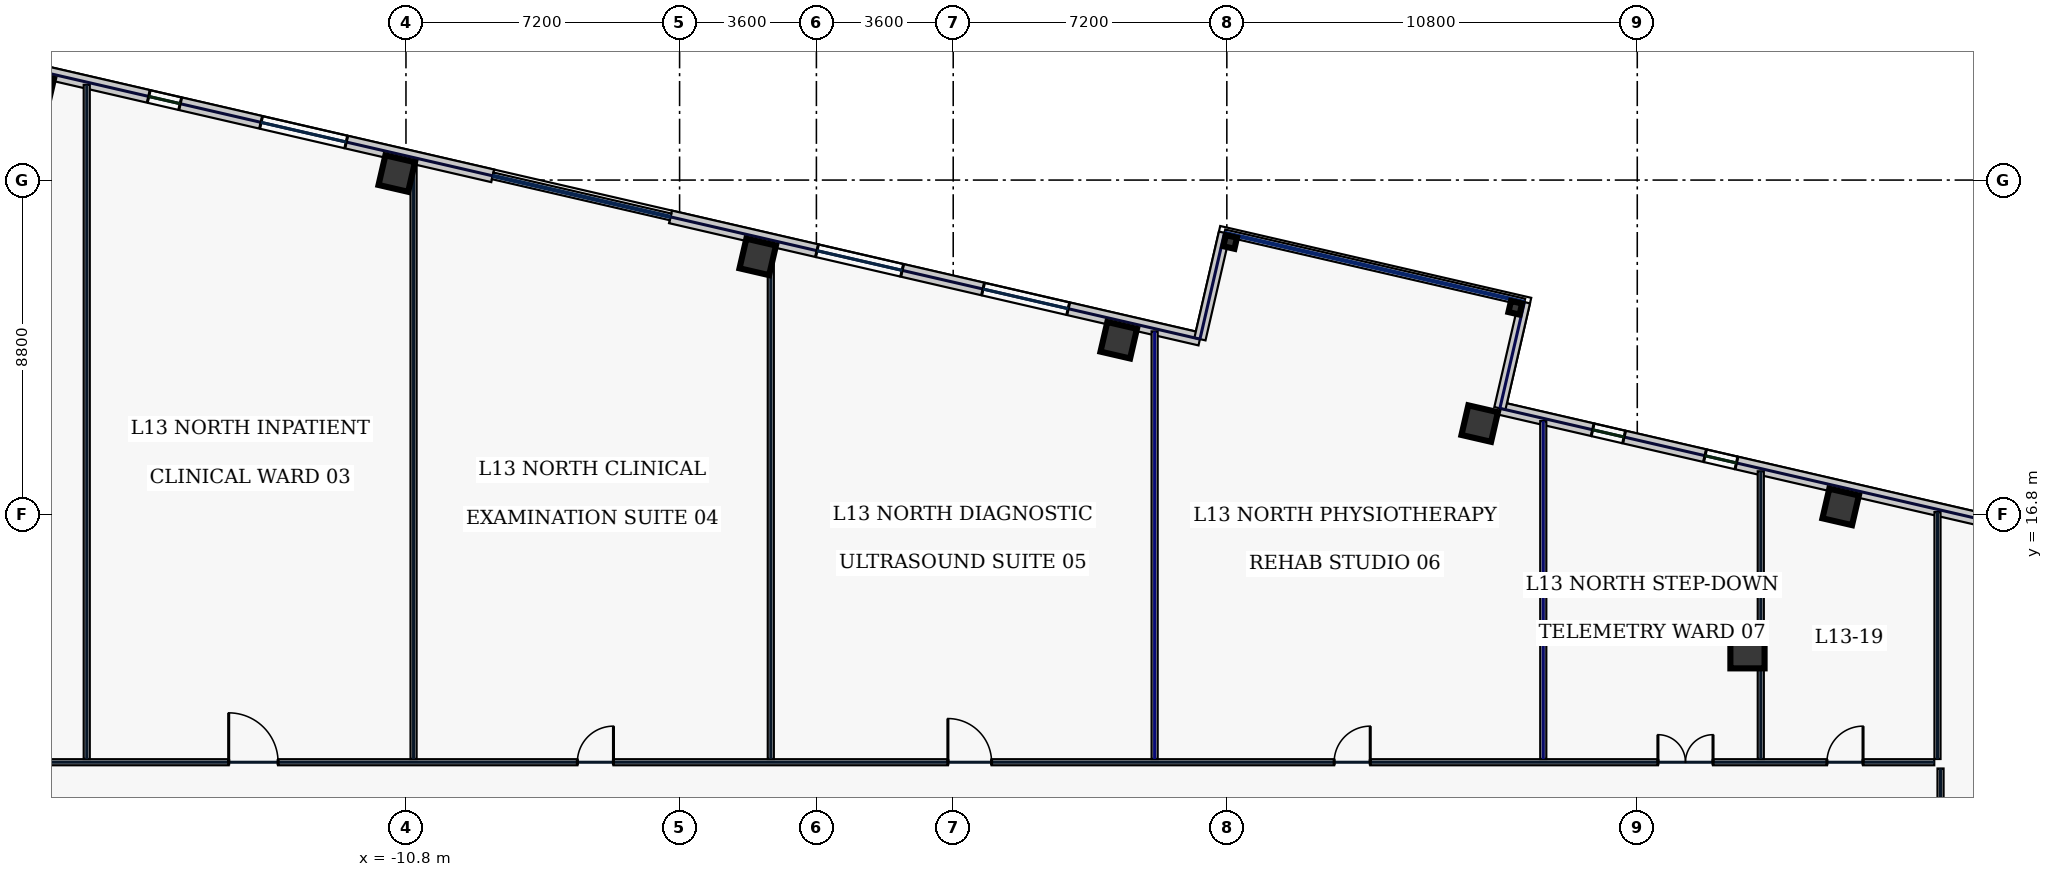
"""IFC4 building model, lengths in metres.
Left out: names, types, materials, properties, quantities, classifications, styles, units other than length and angle.
Written with IfcOpenShell. Run it as: python <this file> out.ifc"""

import sys

from ifc_helpers import new_model, si_unit, direction, frame, frame_2d, origin, origin_2d, place, context, subcontext, project, spatial, rectangle, hollow_rectangle, extrude, element, fill, save


model = new_model("IFC4")
c1 = context("Model", 3, precision=1e-05, world=origin(), true_north=direction((0.0, 1.0)))
c2 = subcontext(c1, "Body", "Model", "MODEL_VIEW")
j1 = project(units=[si_unit("LENGTHUNIT", "METRE"), si_unit("PLANEANGLEUNIT", "RADIAN")], contexts=[c1])
p1 = place(None, origin())
s1 = spatial("IfcSite", under=j1, at=p1, CompositionType="ELEMENT")
p2 = place(p1, origin())
s2 = spatial("IfcBuilding", under=s1, at=p2, CompositionType="ELEMENT")
p3 = place(p2, frame((0.0, 0.0, 63.4)))
s3 = spatial("IfcBuildingStorey", under=s2, at=p3, CompositionType="ELEMENT", Elevation=63.4)
p4 = place(p3, frame((24.5, 13.2, 0.0), z_axis=(0.0, 0.0, 1.0), x_axis=(1.0, 0.0, 0.0)))
e1 = element("IfcColumn", 1, at=p4, inside=s3, PredefinedType="COLUMN", context=c2, shape_type="SweptSolid", body=[
    extrude(hollow_rectangle(XDim=0.9, YDim=0.9, WallThickness=0.04, at=origin_2d()), origin(), (0.0, 0.0, 1.0), 3.74),
])
for number, where, z_axis, x_axis in (
    (2, (26.952, 16.999, 0.0), (0.0, 0.0, 1.0), (0.974, -0.225, 0.0)),
    (3, (17.454, 19.192, 0.0), (0.0, 0.0, 1.0), (0.974, -0.225, 0.0)),
    (4, (7.955, 21.385, 0.0), (0.0, 0.0, 1.0), (0.974, -0.225, 0.0)),
    (5, (-1.544, 23.578, 0.0), (0.0, 0.0, 1.0), (0.974, -0.225, 0.0)),
    (6, (-11.042, 25.771, 0.0), (0.0, 0.0, 1.0), (0.974, -0.225, 0.0)),
    (7, (-20.541, 27.964, 0.0), (0.0, 0.0, 1.0), (0.974, -0.225, 0.0)),
):
    element("IfcColumn", number, at=place(p3, frame(where, z_axis=z_axis, x_axis=x_axis)), inside=s3, PredefinedType="COLUMN", context=c2, shape_type="SweptSolid", body=[
        extrude(hollow_rectangle(XDim=0.8, YDim=0.8, WallThickness=0.036, at=origin_2d()), origin(), (0.0, 0.0, 1.0), 3.74),
    ])
for number, where, z_axis, x_axis in (
    (8, (10.888, 23.971, 0.0), (0.0, 0.0, 1.0), (0.974, -0.225, 0.0)),
    (9, (18.391, 22.239, 0.0), (0.0, 0.0, 1.0), (0.974, -0.225, 0.0)),
):
    element("IfcColumn", number, at=place(p3, frame(where, z_axis=z_axis, x_axis=x_axis)), inside=s3, PredefinedType="COLUMN", context=c2, shape_type="SweptSolid", body=[
        extrude(hollow_rectangle(XDim=0.3, YDim=0.3, WallThickness=0.016, at=origin_2d()), origin(), (0.0, 0.0, 1.0), 3.74),
    ])
p5 = place(p3, frame((37.229, 15.15, 0.0), z_axis=(0.0, 0.0, 1.0), x_axis=(-0.974368689865, 0.224957009695, 0.0)))
e10 = element("IfcWall", 10, at=p5, inside=s3, PredefinedType="STANDARD", context=c2, shape_type="SweptSolid", body=[
    extrude(rectangle(XDim=19.75, YDim=0.34, at=frame_2d((9.875, 0.0))), origin(), (0.0, 0.0, 1.0), 3.74),
])
p6 = place(p5, frame((16.395, 0.0, 0.77)))
e11 = element("IfcOpeningElement", 11, at=p6, cuts=e10, PredefinedType="OPENING", context=c2, shape_type="SweptSolid", body=[
    extrude(rectangle(XDim=0.85, YDim=1.85, at=frame_2d((0.425, 0.925))), frame((0.0, 0.18, 0.0), z_axis=(0.0, -1.0, 0.0), x_axis=(1.0, 0.0, 0.0)), (0.0, 0.0, 1.0), 0.36),
])
p7 = place(p5, frame((13.361, 0.0, 0.77)))
e12 = element("IfcOpeningElement", 12, at=p7, cuts=e10, PredefinedType="OPENING", context=c2, shape_type="SweptSolid", body=[
    extrude(rectangle(XDim=0.85, YDim=1.85, at=frame_2d((0.425, 0.925))), frame((0.0, 0.18, 0.0), z_axis=(0.0, -1.0, 0.0), x_axis=(1.0, 0.0, 0.0)), (0.0, 0.0, 1.0), 0.36),
])
p8 = place(p5, frame((2.162, 0.0, 0.77)))
e13 = element("IfcOpeningElement", 13, at=p8, cuts=e10, PredefinedType="OPENING", context=c2, shape_type="SweptSolid", body=[
    extrude(rectangle(XDim=2.3, YDim=2.1, at=frame_2d((1.15, 1.05))), frame((0.0, 0.18, 0.0), z_axis=(0.0, -1.0, 0.0), x_axis=(1.0, 0.0, 0.0)), (0.0, 0.0, 1.0), 0.36),
])
p9 = place(p3, frame((10.092, 21.415, 0.0), z_axis=(0.0, 0.0, 1.0), x_axis=(-0.97436816851, 0.224959267855, 0.0)))
e14 = element("IfcWall", 14, at=p9, inside=s3, PredefinedType="STANDARD", context=c2, shape_type="SweptSolid", body=[
    extrude(rectangle(XDim=14.298, YDim=0.34, at=frame_2d((7.149, 0.0))), origin(), (0.0, 0.0, 1.0), 3.74),
])
p10 = place(p9, frame((8.042, 0.0, 0.77)))
e15 = element("IfcOpeningElement", 15, at=p10, cuts=e14, PredefinedType="OPENING", context=c2, shape_type="SweptSolid", body=[
    extrude(rectangle(XDim=2.3, YDim=2.1, at=frame_2d((1.15, 1.05))), frame((0.0, 0.18, 0.0), z_axis=(0.0, -1.0, 0.0), x_axis=(1.0, 0.0, 0.0)), (0.0, 0.0, 1.0), 0.36),
])
p11 = place(p9, frame((3.558, 0.0, 0.77)))
e16 = element("IfcOpeningElement", 16, at=p11, cuts=e14, PredefinedType="OPENING", context=c2, shape_type="SweptSolid", body=[
    extrude(rectangle(XDim=2.3, YDim=2.1, at=frame_2d((1.15, 1.05))), frame((0.0, 0.18, 0.0), z_axis=(0.0, -1.0, 0.0), x_axis=(1.0, 0.0, 0.0)), (0.0, 0.0, 1.0), 0.36),
])
p12 = place(p3, frame((-8.517, 25.711, 0.0), z_axis=(0.0, 0.0, 1.0), x_axis=(-0.974372845456, 0.224939009598, 0.0)))
e17 = element("IfcWall", 17, at=p12, inside=s3, PredefinedType="STANDARD", context=c2, shape_type="SweptSolid", body=[
    extrude(rectangle(XDim=22.652, YDim=0.34, at=frame_2d((11.326, 0.0))), origin(), (0.0, 0.0, 1.0), 3.74),
])
p13 = place(p12, frame((18.189, 0.0, 0.77)))
e18 = element("IfcOpeningElement", 18, at=p13, cuts=e17, PredefinedType="OPENING", context=c2, shape_type="SweptSolid", body=[
    extrude(rectangle(XDim=2.3, YDim=2.1, at=frame_2d((1.15, 1.05))), frame((0.0, 0.18, 0.0), z_axis=(0.0, -1.0, 0.0), x_axis=(1.0, 0.0, 0.0)), (0.0, 0.0, 1.0), 0.36),
])
p14 = place(p12, frame((13.705, 0.0, 0.77)))
e19 = element("IfcOpeningElement", 19, at=p14, cuts=e17, PredefinedType="OPENING", context=c2, shape_type="SweptSolid", body=[
    extrude(rectangle(XDim=2.3, YDim=2.1, at=frame_2d((1.15, 1.05))), frame((0.0, 0.18, 0.0), z_axis=(0.0, -1.0, 0.0), x_axis=(1.0, 0.0, 0.0)), (0.0, 0.0, 1.0), 0.36),
])
p15 = place(p12, frame((8.441, 0.0, 0.77)))
e20 = element("IfcOpeningElement", 20, at=p15, cuts=e17, PredefinedType="OPENING", context=c2, shape_type="SweptSolid", body=[
    extrude(rectangle(XDim=0.85, YDim=1.85, at=frame_2d((0.425, 0.925))), frame((0.0, 0.18, 0.0), z_axis=(0.0, -1.0, 0.0), x_axis=(1.0, 0.0, 0.0)), (0.0, 0.0, 1.0), 0.36),
])
p16 = place(p12, frame((3.956, 0.0, 0.77)))
e21 = element("IfcOpeningElement", 21, at=p16, cuts=e17, PredefinedType="OPENING", context=c2, shape_type="SweptSolid", body=[
    extrude(rectangle(XDim=2.3, YDim=2.1, at=frame_2d((1.15, 1.05))), frame((0.0, 0.18, 0.0), z_axis=(0.0, -1.0, 0.0), x_axis=(1.0, 0.0, 0.0)), (0.0, 0.0, 1.0), 0.36),
])
p17 = place(p3, frame((10.092, 21.415, 0.0), z_axis=(0.0, 0.0, 1.0), x_axis=(0.225002397841, 0.97435820978, 0.0)))
e22 = element("IfcWall", 22, at=p17, inside=s3, PredefinedType="STANDARD", context=c2, shape_type="SweptSolid", body=[
    extrude(rectangle(XDim=2.87, YDim=0.3, at=frame_2d((1.435, 0.0))), origin(), (0.0, 0.0, 1.0), 1.535),
])
p18 = place(p3, frame((17.985, 19.593, 0.0), z_axis=(0.0, 0.0, 1.0), x_axis=(0.224921635065, 0.974376856293, 0.0)))
e23 = element("IfcWall", 23, at=p18, inside=s3, PredefinedType="STANDARD", context=c2, shape_type="SweptSolid", body=[
    extrude(rectangle(XDim=2.87, YDim=0.3, at=frame_2d((1.435, 0.0))), origin(), (0.0, 0.0, 1.0), 3.74),
])
p19 = place(p3, frame((-29.415, 10.28, 0.0), z_axis=(0.0, 0.0, 1.0), x_axis=(1.0, 0.0, 0.0)))
e24 = element("IfcWall", 24, at=p19, inside=s3, PredefinedType="PARTITIONING", context=c2, shape_type="SweptSolid", body=[
    extrude(rectangle(XDim=58.83, YDim=0.16, at=frame_2d((29.415, 0.0))), origin(), (0.0, 0.0, 1.0), 3.74),
])
p20 = place(p19, frame((1.869, 0.0, 0.0)))
e25 = element("IfcOpeningElement", 25, at=p20, cuts=e24, PredefinedType="OPENING", context=c2, shape_type="SweptSolid", body=[
    extrude(rectangle(XDim=1.45, YDim=2.2, at=frame_2d((0.725, 1.1))), frame((0.0, 0.09, 0.0), z_axis=(0.0, -1.0, 0.0), x_axis=(1.0, 0.0, 0.0)), (0.0, 0.0, 1.0), 0.18),
])
p21 = place(p19, frame((7.0, 0.0, 0.0)))
e26 = element("IfcOpeningElement", 26, at=p21, cuts=e24, PredefinedType="OPENING", context=c2, shape_type="SweptSolid", body=[
    extrude(rectangle(XDim=1.05, YDim=2.2, at=frame_2d((0.525, 1.1))), frame((0.0, 0.09, 0.0), z_axis=(0.0, -1.0, 0.0), x_axis=(1.0, 0.0, 0.0)), (0.0, 0.0, 1.0), 0.18),
])
p22 = place(p19, frame((13.95, 0.0, 0.0)))
e27 = element("IfcOpeningElement", 27, at=p22, cuts=e24, PredefinedType="OPENING", context=c2, shape_type="SweptSolid", body=[
    extrude(rectangle(XDim=1.3, YDim=2.2, at=frame_2d((0.65, 1.1))), frame((0.0, 0.09, 0.0), z_axis=(0.0, -1.0, 0.0), x_axis=(1.0, 0.0, 0.0)), (0.0, 0.0, 1.0), 0.18),
])
p23 = place(p19, frame((23.125, 0.0, 0.0)))
e28 = element("IfcOpeningElement", 28, at=p23, cuts=e24, PredefinedType="OPENING", context=c2, shape_type="SweptSolid", body=[
    extrude(rectangle(XDim=0.95, YDim=2.2, at=frame_2d((0.475, 1.1))), frame((0.0, 0.09, 0.0), z_axis=(0.0, -1.0, 0.0), x_axis=(1.0, 0.0, 0.0)), (0.0, 0.0, 1.0), 0.18),
])
p24 = place(p19, frame((32.875, 0.0, 0.0)))
e29 = element("IfcOpeningElement", 29, at=p24, cuts=e24, PredefinedType="OPENING", context=c2, shape_type="SweptSolid", body=[
    extrude(rectangle(XDim=1.15, YDim=2.2, at=frame_2d((0.575, 1.1))), frame((0.0, 0.09, 0.0), z_axis=(0.0, -1.0, 0.0), x_axis=(1.0, 0.0, 0.0)), (0.0, 0.0, 1.0), 0.18),
])
p25 = place(p19, frame((43.039, 0.0, 0.0)))
e30 = element("IfcOpeningElement", 30, at=p25, cuts=e24, PredefinedType="OPENING", context=c2, shape_type="SweptSolid", body=[
    extrude(rectangle(XDim=0.95, YDim=2.2, at=frame_2d((0.475, 1.1))), frame((0.0, 0.09, 0.0), z_axis=(0.0, -1.0, 0.0), x_axis=(1.0, 0.0, 0.0)), (0.0, 0.0, 1.0), 0.18),
])
p26 = place(p19, frame((51.559, 0.0, 0.0)))
e31 = element("IfcOpeningElement", 31, at=p26, cuts=e24, PredefinedType="OPENING", context=c2, shape_type="SweptSolid", body=[
    extrude(rectangle(XDim=1.45, YDim=2.2, at=frame_2d((0.725, 1.1))), frame((0.0, 0.09, 0.0), z_axis=(0.0, -1.0, 0.0), x_axis=(1.0, 0.0, 0.0)), (0.0, 0.0, 1.0), 0.18),
])
p27 = place(p19, frame((56.006, 0.0, 0.0)))
e32 = element("IfcOpeningElement", 32, at=p27, cuts=e24, PredefinedType="OPENING", context=c2, shape_type="SweptSolid", body=[
    extrude(rectangle(XDim=0.95, YDim=2.2, at=frame_2d((0.475, 1.1))), frame((0.0, 0.09, 0.0), z_axis=(0.0, -1.0, 0.0), x_axis=(1.0, 0.0, 0.0)), (0.0, 0.0, 1.0), 0.18),
])
p28 = place(p3, frame((29.58, 10.115, 0.0), z_axis=(0.0, 0.0, 1.0), x_axis=(0.0, -1.0, 0.0)))
e33 = element("IfcWall", 33, at=p28, inside=s3, PredefinedType="PARTITIONING", context=c2, shape_type="SweptSolid", body=[
    extrude(rectangle(XDim=20.13, YDim=0.16, at=frame_2d((10.065, 0.0))), origin(), (0.0, 0.0, 1.0), 3.74),
])
p29 = place(p28, frame((17.181, 0.0, 0.0)))
e34 = element("IfcOpeningElement", 34, at=p29, cuts=e33, PredefinedType="OPENING", context=c2, shape_type="SweptSolid", body=[
    extrude(rectangle(XDim=0.95, YDim=2.2, at=frame_2d((0.475, 1.1))), frame((0.0, 0.09, 0.0), z_axis=(0.0, -1.0, 0.0), x_axis=(1.0, 0.0, 0.0)), (0.0, 0.0, 1.0), 0.18),
])
p30 = place(p28, frame((12.325, 0.0, 0.0)))
e35 = element("IfcOpeningElement", 35, at=p30, cuts=e33, PredefinedType="OPENING", context=c2, shape_type="SweptSolid", body=[
    extrude(rectangle(XDim=0.95, YDim=2.2, at=frame_2d((0.475, 1.1))), frame((0.0, 0.09, 0.0), z_axis=(0.0, -1.0, 0.0), x_axis=(1.0, 0.0, 0.0)), (0.0, 0.0, 1.0), 0.18),
])
p31 = place(p28, frame((7.125, 0.0, 0.0)))
e36 = element("IfcOpeningElement", 36, at=p31, cuts=e33, PredefinedType="OPENING", context=c2, shape_type="SweptSolid", body=[
    extrude(rectangle(XDim=0.95, YDim=2.2, at=frame_2d((0.475, 1.1))), frame((0.0, 0.09, 0.0), z_axis=(0.0, -1.0, 0.0), x_axis=(1.0, 0.0, 0.0)), (0.0, 0.0, 1.0), 0.18),
])
p32 = place(p28, frame((2.219, 0.0, 0.0)))
e37 = element("IfcOpeningElement", 37, at=p32, cuts=e33, PredefinedType="OPENING", context=c2, shape_type="SweptSolid", body=[
    extrude(rectangle(XDim=0.95, YDim=2.2, at=frame_2d((0.475, 1.1))), frame((0.0, 0.09, 0.0), z_axis=(0.0, -1.0, 0.0), x_axis=(1.0, 0.0, 0.0)), (0.0, 0.0, 1.0), 0.18),
])
p33 = place(p3, frame((29.5, 10.365, 0.0), z_axis=(0.0, 0.0, 1.0), x_axis=(0.0, 1.0, 0.0)))
e38 = element("IfcWall", 38, at=p33, inside=s3, PredefinedType="PARTITIONING", context=c2, shape_type="SweptSolid", body=[
    extrude(rectangle(XDim=6.497, YDim=0.16, at=frame_2d((3.249, 0.0))), origin(), (0.0, 0.0, 1.0), 3.74),
])
p34 = place(p3, frame((-19.2, 10.365, 0.0), z_axis=(0.0, 0.0, 1.0), x_axis=(0.0, 1.0, 0.0)))
e39 = element("IfcWall", 39, at=p34, inside=s3, PredefinedType="PARTITIONING", context=c2, shape_type="SweptSolid", body=[
    extrude(rectangle(XDim=17.741, YDim=0.16, at=frame_2d((8.87, 0.0))), origin(), (0.0, 0.0, 1.0), 3.74),
])
p35 = place(p3, frame((-10.6, 10.365, 0.0), z_axis=(0.0, 0.0, 1.0), x_axis=(0.0, 1.0, 0.0)))
e40 = element("IfcWall", 40, at=p35, inside=s3, PredefinedType="PARTITIONING", context=c2, shape_type="SweptSolid", body=[
    extrude(rectangle(XDim=15.755, YDim=0.16, at=frame_2d((7.877, 0.0))), origin(), (0.0, 0.0, 1.0), 3.74),
])
p36 = place(p3, frame((-1.2, 10.365, 0.0), z_axis=(0.0, 0.0, 1.0), x_axis=(0.0, 1.0, 0.0)))
e41 = element("IfcWall", 41, at=p36, inside=s3, PredefinedType="PARTITIONING", context=c2, shape_type="SweptSolid", body=[
    extrude(rectangle(XDim=13.585, YDim=0.16, at=frame_2d((6.792, 0.0))), origin(), (0.0, 0.0, 1.0), 3.74),
])
p37 = place(p3, frame((8.9, 10.365, 0.0), z_axis=(0.0, 0.0, 1.0), x_axis=(0.0, 1.0, 0.0)))
e42 = element("IfcWall", 42, at=p37, inside=s3, PredefinedType="PARTITIONING", context=c2, shape_type="SweptSolid", body=[
    extrude(rectangle(XDim=11.253, YDim=0.16, at=frame_2d((5.627, 0.0))), origin(), (0.0, 0.0, 1.0), 3.235),
])
p38 = place(p3, frame((19.127, 10.365, 0.0), z_axis=(0.0, 0.0, 1.0), x_axis=(0.0, 1.0, 0.0)))
e43 = element("IfcWall", 43, at=p38, inside=s3, PredefinedType="PARTITIONING", context=c2, shape_type="SweptSolid", body=[
    extrude(rectangle(XDim=8.892, YDim=0.16, at=frame_2d((4.446, 0.0))), origin(), (0.0, 0.0, 1.0), 1.535),
])
p39 = place(p3, frame((24.85, 10.365, 0.0), z_axis=(0.0, 0.0, 1.0), x_axis=(0.0, 1.0, 0.0)))
e44 = element("IfcWall", 44, at=p39, inside=s3, PredefinedType="PARTITIONING", context=c2, shape_type="SweptSolid", body=[
    extrude(rectangle(XDim=7.571, YDim=0.16, at=frame_2d((3.785, 0.0))), origin(), (0.0, 0.0, 1.0), 3.74),
])
p40 = place(p6, origin())
e45 = element("IfcWindow", 45, at=p40, inside=s3, PartitioningType="SINGLE_PANEL", PredefinedType="WINDOW", context=c2, shape_type="SweptSolid", body=[
    extrude(rectangle(XDim=0.85, YDim=1.85, at=frame_2d((0.425, 0.925))), frame((0.0, 0.03, 0.0), z_axis=(0.0, -1.0, 0.0), x_axis=(1.0, 0.0, 0.0)), (0.0, 0.0, 1.0), 0.06),
])
fill(e11, e45)
p41 = place(p7, origin())
e46 = element("IfcWindow", 46, at=p41, inside=s3, PartitioningType="SINGLE_PANEL", PredefinedType="WINDOW", context=c2, shape_type="SweptSolid", body=[
    extrude(rectangle(XDim=0.85, YDim=1.85, at=frame_2d((0.425, 0.925))), frame((0.0, 0.03, 0.0), z_axis=(0.0, -1.0, 0.0), x_axis=(1.0, 0.0, 0.0)), (0.0, 0.0, 1.0), 0.06),
])
fill(e12, e46)
p42 = place(p10, origin())
e47 = element("IfcWindow", 47, at=p42, inside=s3, PartitioningType="SINGLE_PANEL", PredefinedType="WINDOW", context=c2, shape_type="SweptSolid", body=[
    extrude(rectangle(XDim=2.3, YDim=2.1, at=frame_2d((1.15, 1.05))), frame((0.0, 0.03, 0.0), z_axis=(0.0, -1.0, 0.0), x_axis=(1.0, 0.0, 0.0)), (0.0, 0.0, 1.0), 0.06),
])
fill(e15, e47)
p43 = place(p11, origin())
e48 = element("IfcWindow", 48, at=p43, inside=s3, PartitioningType="SINGLE_PANEL", PredefinedType="WINDOW", context=c2, shape_type="SweptSolid", body=[
    extrude(rectangle(XDim=2.3, YDim=2.1, at=frame_2d((1.15, 1.05))), frame((0.0, 0.03, 0.0), z_axis=(0.0, -1.0, 0.0), x_axis=(1.0, 0.0, 0.0)), (0.0, 0.0, 1.0), 0.06),
])
fill(e16, e48)
p44 = place(p15, origin())
e49 = element("IfcWindow", 49, at=p44, inside=s3, PartitioningType="SINGLE_PANEL", PredefinedType="WINDOW", context=c2, shape_type="SweptSolid", body=[
    extrude(rectangle(XDim=0.85, YDim=1.85, at=frame_2d((0.425, 0.925))), frame((0.0, 0.03, 0.0), z_axis=(0.0, -1.0, 0.0), x_axis=(1.0, 0.0, 0.0)), (0.0, 0.0, 1.0), 0.06),
])
fill(e20, e49)
p45 = place(p16, origin())
e50 = element("IfcWindow", 50, at=p45, inside=s3, PartitioningType="SINGLE_PANEL", PredefinedType="WINDOW", context=c2, shape_type="SweptSolid", body=[
    extrude(rectangle(XDim=2.3, YDim=2.1, at=frame_2d((1.15, 1.05))), frame((0.0, 0.03, 0.0), z_axis=(0.0, -1.0, 0.0), x_axis=(1.0, 0.0, 0.0)), (0.0, 0.0, 1.0), 0.06),
])
fill(e21, e50)
p46 = place(p22, origin())
e51 = element("IfcDoor", 51, at=p46, inside=s3, OperationType="SINGLE_SWING_LEFT", PredefinedType="DOOR", context=c2, shape_type="SweptSolid", body=[
    extrude(rectangle(XDim=1.3, YDim=2.2, at=frame_2d((0.65, 1.1))), frame((0.0, 0.025, 0.0), z_axis=(0.0, -1.0, 0.0), x_axis=(1.0, 0.0, 0.0)), (0.0, 0.0, 1.0), 0.05),
])
fill(e27, e51)
p47 = place(p23, origin())
e52 = element("IfcDoor", 52, at=p47, inside=s3, OperationType="SINGLE_SWING_RIGHT", PredefinedType="DOOR", context=c2, shape_type="SweptSolid", body=[
    extrude(rectangle(XDim=0.95, YDim=2.2, at=frame_2d((0.475, 1.1))), frame((0.0, 0.025, 0.0), z_axis=(0.0, -1.0, 0.0), x_axis=(1.0, 0.0, 0.0)), (0.0, 0.0, 1.0), 0.05),
])
fill(e28, e52)
p48 = place(p24, origin())
e53 = element("IfcDoor", 53, at=p48, inside=s3, OperationType="SINGLE_SWING_LEFT", PredefinedType="DOOR", context=c2, shape_type="SweptSolid", body=[
    extrude(rectangle(XDim=1.15, YDim=2.2, at=frame_2d((0.575, 1.1))), frame((0.0, 0.025, 0.0), z_axis=(0.0, -1.0, 0.0), x_axis=(1.0, 0.0, 0.0)), (0.0, 0.0, 1.0), 0.05),
])
fill(e29, e53)
p49 = place(p25, origin())
e54 = element("IfcDoor", 54, at=p49, inside=s3, OperationType="SINGLE_SWING_RIGHT", PredefinedType="DOOR", context=c2, shape_type="SweptSolid", body=[
    extrude(rectangle(XDim=0.95, YDim=2.2, at=frame_2d((0.475, 1.1))), frame((0.0, 0.025, 0.0), z_axis=(0.0, -1.0, 0.0), x_axis=(1.0, 0.0, 0.0)), (0.0, 0.0, 1.0), 0.05),
])
fill(e30, e54)
p50 = place(p26, origin())
e55 = element("IfcDoor", 55, at=p50, inside=s3, OperationType="DOUBLE_SWING_LEFT", PredefinedType="DOOR", context=c2, shape_type="SweptSolid", body=[
    extrude(rectangle(XDim=1.45, YDim=2.2, at=frame_2d((0.725, 1.1))), frame((0.0, 0.025, 0.0), z_axis=(0.0, -1.0, 0.0), x_axis=(1.0, 0.0, 0.0)), (0.0, 0.0, 1.0), 0.05),
])
fill(e31, e55)
p51 = place(p27, origin())
e56 = element("IfcDoor", 56, at=p51, inside=s3, OperationType="SINGLE_SWING_RIGHT", PredefinedType="DOOR", context=c2, shape_type="SweptSolid", body=[
    extrude(rectangle(XDim=0.95, YDim=2.2, at=frame_2d((0.475, 1.1))), frame((0.0, 0.025, 0.0), z_axis=(0.0, -1.0, 0.0), x_axis=(1.0, 0.0, 0.0)), (0.0, 0.0, 1.0), 0.05),
])
fill(e32, e56)
save(model, sys.argv[1])
